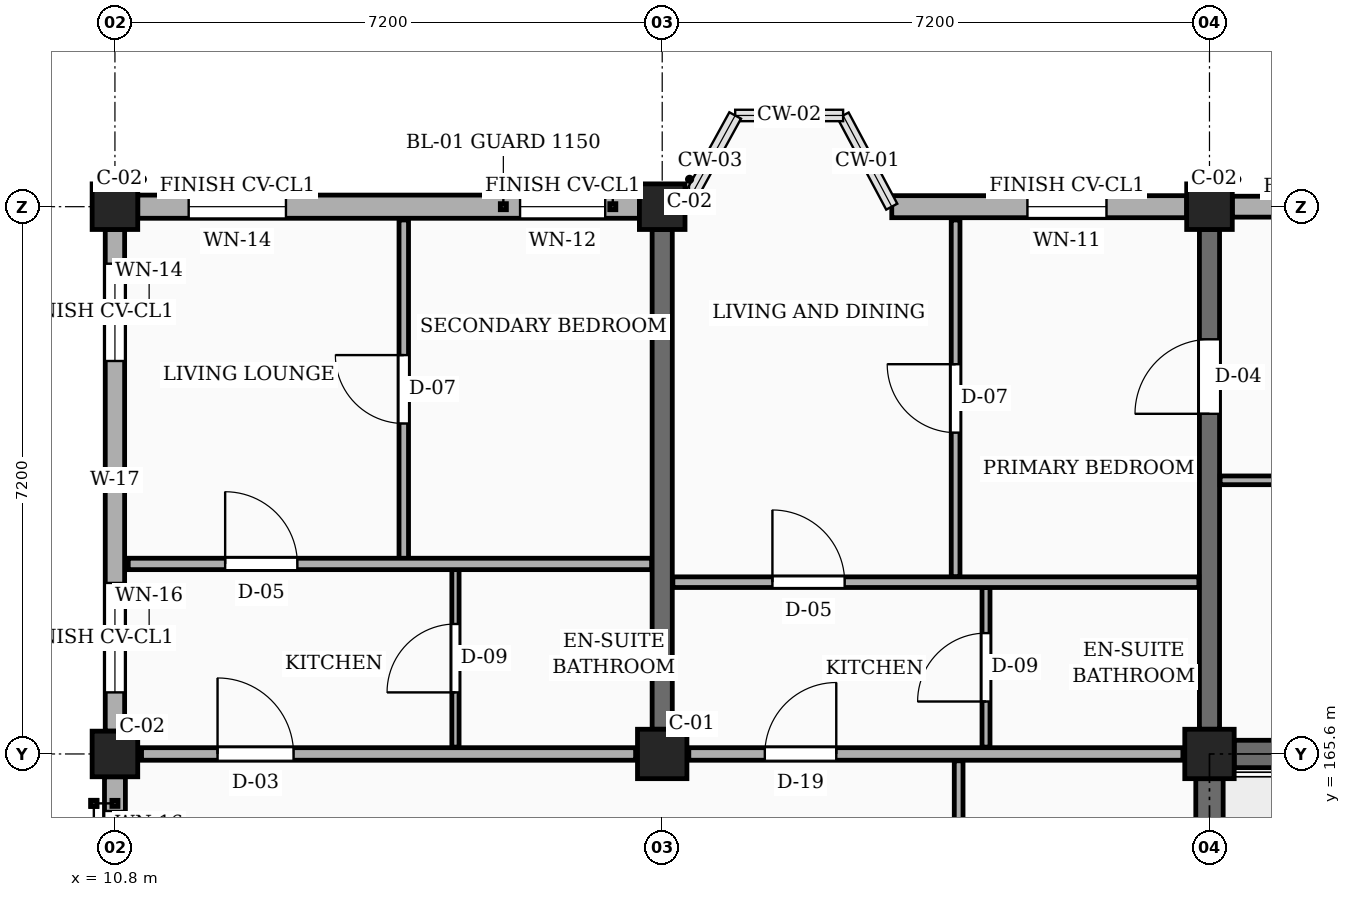
"""IFC4 building model, lengths in metres.
Left out: names, types, materials, properties, quantities, classifications, styles, units other than length and angle.
Written with IfcOpenShell. Run it as: python <this file> out.ifc"""

import sys

from ifc_helpers import new_model, si_unit, direction, frame, frame_2d, origin, origin_2d, place, context, subcontext, project, spatial, rectangle, extrude, element, fill, save


model = new_model("IFC4")
c1 = context("Model", 3, precision=1e-05, world=origin(), true_north=direction((0.0, 1.0)))
c2 = subcontext(c1, "Body", "Model", "MODEL_VIEW")
j1 = project(units=[si_unit("LENGTHUNIT", "METRE"), si_unit("PLANEANGLEUNIT", "RADIAN")], contexts=[c1])
p1 = place(None, origin())
s1 = spatial("IfcSite", under=j1, at=p1, CompositionType="ELEMENT")
p2 = place(p1, origin())
s2 = spatial("IfcBuilding", under=s1, at=p2, CompositionType="ELEMENT")
p3 = place(p2, frame((0.0, 0.0, 7.65)))
s3 = spatial("IfcBuildingStorey", under=s2, at=p3, CompositionType="ELEMENT", Elevation=7.65)
for number, where, z_axis, x_axis in (
    (1, (10.8, 165.6, 0.0), (0.0, 0.0, 1.0), (1.0, 0.0, 0.0)),
    (2, (10.8, 172.8, 0.0), (0.0, 0.0, 1.0), (1.0, 0.0, 0.0)),
):
    element("IfcColumn", number, at=place(p3, frame(where, z_axis=z_axis, x_axis=x_axis)), inside=s3, PredefinedType="COLUMN", context=c2, shape_type="SweptSolid", body=[
        extrude(rectangle(XDim=0.6, YDim=0.6, at=origin_2d()), origin(), (0.0, 0.0, 1.0), 3.15),
    ])
p4 = place(p3, frame((18.0, 165.6, 0.0), z_axis=(0.0, 0.0, 1.0), x_axis=(1.0, 0.0, 0.0)))
e3 = element("IfcColumn", 3, at=p4, inside=s3, PredefinedType="COLUMN", context=c2, shape_type="SweptSolid", body=[
    extrude(rectangle(XDim=0.65, YDim=0.65, at=origin_2d()), origin(), (0.0, 0.0, 1.0), 3.15),
])
p5 = place(p3, frame((18.0, 172.8, 0.0), z_axis=(0.0, 0.0, 1.0), x_axis=(1.0, 0.0, 0.0)))
e4 = element("IfcColumn", 4, at=p5, inside=s3, PredefinedType="COLUMN", context=c2, shape_type="SweptSolid", body=[
    extrude(rectangle(XDim=0.6, YDim=0.6, at=origin_2d()), origin(), (0.0, 0.0, 1.0), 3.15),
])
p6 = place(p3, frame((25.2, 165.6, 0.0), z_axis=(0.0, 0.0, 1.0), x_axis=(1.0, 0.0, 0.0)))
e5 = element("IfcColumn", 5, at=p6, inside=s3, PredefinedType="COLUMN", context=c2, shape_type="SweptSolid", body=[
    extrude(rectangle(XDim=0.65, YDim=0.65, at=origin_2d()), origin(), (0.0, 0.0, 1.0), 3.15),
])
p7 = place(p3, frame((25.2, 172.8, 0.0), z_axis=(0.0, 0.0, 1.0), x_axis=(1.0, 0.0, 0.0)))
e6 = element("IfcColumn", 6, at=p7, inside=s3, PredefinedType="COLUMN", context=c2, shape_type="SweptSolid", body=[
    extrude(rectangle(XDim=0.6, YDim=0.6, at=origin_2d()), origin(), (0.0, 0.0, 1.0), 3.15),
])
p8 = place(p3, frame((18.0, 165.925, 0.0), z_axis=(0.0, 0.0, 1.0), x_axis=(0.0, 1.0, 0.0)))
e7 = element("IfcWall", 7, at=p8, inside=s3, PredefinedType="SOLIDWALL", context=c2, shape_type="SweptSolid", body=[
    extrude(rectangle(XDim=6.575, YDim=0.265, at=frame_2d((3.288, 0.0))), origin(), (0.0, 0.0, 1.0), 2.185),
])
p9 = place(p3, frame((25.2, 165.925, 0.0), z_axis=(0.0, 0.0, 1.0), x_axis=(0.0, 1.0, 0.0)))
e8 = element("IfcWall", 8, at=p9, inside=s3, PredefinedType="SOLIDWALL", context=c2, shape_type="SweptSolid", body=[
    extrude(rectangle(XDim=6.575, YDim=0.265, at=frame_2d((3.288, 0.0))), origin(), (0.0, 0.0, 1.0), 2.185),
])
p10 = place(p9, frame((4.15, 0.0, 0.0)))
e9 = element("IfcOpeningElement", 9, at=p10, cuts=e8, PredefinedType="OPENING", context=c2, shape_type="SweptSolid", body=[
    extrude(rectangle(XDim=0.98, YDim=2.12, at=frame_2d((0.49, 1.06))), frame((0.0, 0.143, 0.0), z_axis=(0.0, -1.0, 0.0), x_axis=(1.0, 0.0, 0.0)), (0.0, 0.0, 1.0), 0.285),
])
p11 = place(p3, frame((32.1, 172.8, 0.0), z_axis=(0.0, 0.0, 1.0), x_axis=(-1.0, 0.0, 0.0)))
e10 = element("IfcWall", 10, at=p11, inside=s3, PredefinedType="SOLIDWALL", context=c2, shape_type="SweptSolid", body=[
    extrude(rectangle(XDim=6.6, YDim=0.275, at=frame_2d((3.3, 0.0))), origin(), (0.0, 0.0, 1.0), 2.455),
])
p12 = place(p11, frame((0.45, 0.0, 0.78)))
e11 = element("IfcOpeningElement", 11, at=p12, cuts=e10, PredefinedType="OPENING", context=c2, shape_type="SweptSolid", body=[
    extrude(rectangle(XDim=0.88, YDim=1.26, at=frame_2d((0.44, 0.63))), frame((0.0, 0.147, 0.0), z_axis=(0.0, -1.0, 0.0), x_axis=(1.0, 0.0, 0.0)), (0.0, 0.0, 1.0), 0.295),
])
p13 = place(p11, frame((4.65, 0.0, 0.78)))
e12 = element("IfcOpeningElement", 12, at=p13, cuts=e10, PredefinedType="OPENING", context=c2, shape_type="SweptSolid", body=[
    extrude(rectangle(XDim=1.04, YDim=1.26, at=frame_2d((0.52, 0.63))), frame((0.0, 0.147, 0.0), z_axis=(0.0, -1.0, 0.0), x_axis=(1.0, 0.0, 0.0)), (0.0, 0.0, 1.0), 0.295),
])
p14 = place(p3, frame((24.9, 172.8, 0.0), z_axis=(0.0, 0.0, 1.0), x_axis=(-1.0, 0.0, 0.0)))
e13 = element("IfcWall", 13, at=p14, inside=s3, PredefinedType="SOLIDWALL", context=c2, shape_type="SweptSolid", body=[
    extrude(rectangle(XDim=3.88, YDim=0.29, at=frame_2d((1.94, 0.0))), origin(), (0.0, 0.0, 1.0), 2.455),
])
p15 = place(p14, frame((1.055, 0.0, 0.78)))
e14 = element("IfcOpeningElement", 14, at=p15, cuts=e13, PredefinedType="OPENING", context=c2, shape_type="SweptSolid", body=[
    extrude(rectangle(XDim=1.04, YDim=1.26, at=frame_2d((0.52, 0.63))), frame((0.0, 0.155, 0.0), z_axis=(0.0, -1.0, 0.0), x_axis=(1.0, 0.0, 0.0)), (0.0, 0.0, 1.0), 0.31),
])
p16 = place(p3, frame((17.7, 172.8, 0.0), z_axis=(0.0, 0.0, 1.0), x_axis=(-1.0, 0.0, 0.0)))
e15 = element("IfcWall", 15, at=p16, inside=s3, PredefinedType="SOLIDWALL", context=c2, shape_type="SweptSolid", body=[
    extrude(rectangle(XDim=6.6, YDim=0.305, at=frame_2d((3.3, 0.0))), origin(), (0.0, 0.0, 1.0), 2.455),
])
p17 = place(p16, frame((0.45, 0.0, 0.78)))
e16 = element("IfcOpeningElement", 16, at=p17, cuts=e15, PredefinedType="OPENING", context=c2, shape_type="SweptSolid", body=[
    extrude(rectangle(XDim=1.12, YDim=1.26, at=frame_2d((0.56, 0.63))), frame((0.0, 0.163, 0.0), z_axis=(0.0, -1.0, 0.0), x_axis=(1.0, 0.0, 0.0)), (0.0, 0.0, 1.0), 0.325),
])
p18 = place(p16, frame((4.65, 0.0, 0.78)))
e17 = element("IfcOpeningElement", 17, at=p18, cuts=e15, PredefinedType="OPENING", context=c2, shape_type="SweptSolid", body=[
    extrude(rectangle(XDim=1.28, YDim=1.26, at=frame_2d((0.64, 0.63))), frame((0.0, 0.163, 0.0), z_axis=(0.0, -1.0, 0.0), x_axis=(1.0, 0.0, 0.0)), (0.0, 0.0, 1.0), 0.325),
])
p19 = place(p3, frame((10.8, 172.5, 0.0), z_axis=(0.0, 0.0, 1.0), x_axis=(0.0, -1.0, 0.0)))
e18 = element("IfcWall", 18, at=p19, inside=s3, PredefinedType="SOLIDWALL", context=c2, shape_type="SweptSolid", body=[
    extrude(rectangle(XDim=6.6, YDim=0.255, at=frame_2d((3.3, 0.0))), origin(), (0.0, 0.0, 1.0), 2.455),
])
p20 = place(p19, frame((0.45, 0.0, 0.78)))
e19 = element("IfcOpeningElement", 19, at=p20, cuts=e18, PredefinedType="OPENING", context=c2, shape_type="SweptSolid", body=[
    extrude(rectangle(XDim=1.28, YDim=1.26, at=frame_2d((0.64, 0.63))), frame((0.0, 0.137, 0.0), z_axis=(0.0, -1.0, 0.0), x_axis=(1.0, 0.0, 0.0)), (0.0, 0.0, 1.0), 0.275),
])
p21 = place(p19, frame((4.65, 0.0, 0.78)))
e20 = element("IfcOpeningElement", 20, at=p21, cuts=e18, PredefinedType="OPENING", context=c2, shape_type="SweptSolid", body=[
    extrude(rectangle(XDim=1.44, YDim=1.26, at=frame_2d((0.72, 0.63))), frame((0.0, 0.137, 0.0), z_axis=(0.0, -1.0, 0.0), x_axis=(1.0, 0.0, 0.0)), (0.0, 0.0, 1.0), 0.275),
])
p22 = place(p3, frame((10.8, 165.3, 0.0), z_axis=(0.0, 0.0, 1.0), x_axis=(0.0, -1.0, 0.0)))
e21 = element("IfcWall", 21, at=p22, inside=s3, PredefinedType="SOLIDWALL", context=c2, shape_type="SweptSolid", body=[
    extrude(rectangle(XDim=6.6, YDim=0.275, at=frame_2d((3.3, 0.0))), origin(), (0.0, 0.0, 1.0), 2.455),
])
p23 = place(p22, frame((0.45, 0.0, 0.78)))
e22 = element("IfcOpeningElement", 22, at=p23, cuts=e21, PredefinedType="OPENING", context=c2, shape_type="SweptSolid", body=[
    extrude(rectangle(XDim=1.44, YDim=1.26, at=frame_2d((0.72, 0.63))), frame((0.0, 0.147, 0.0), z_axis=(0.0, -1.0, 0.0), x_axis=(1.0, 0.0, 0.0)), (0.0, 0.0, 1.0), 0.295),
])
p24 = place(p22, frame((4.65, 0.0, 0.78)))
e23 = element("IfcOpeningElement", 23, at=p24, cuts=e21, PredefinedType="OPENING", context=c2, shape_type="SweptSolid", body=[
    extrude(rectangle(XDim=0.98, YDim=1.36, at=frame_2d((0.49, 0.68))), frame((0.0, 0.147, 0.0), z_axis=(0.0, -1.0, 0.0), x_axis=(1.0, 0.0, 0.0)), (0.0, 0.0, 1.0), 0.295),
])
p25 = place(p3, frame((25.2, 158.725, 0.0), z_axis=(0.0, 0.0, 1.0), x_axis=(0.0, 1.0, 0.0)))
e24 = element("IfcWall", 24, at=p25, inside=s3, PredefinedType="SHEAR", context=c2, shape_type="SweptSolid", body=[
    extrude(rectangle(XDim=6.55, YDim=0.36, at=frame_2d((3.275, 0.0))), origin(), (0.0, 0.0, 1.0), 2.885),
])
p26 = place(p3, frame((25.525, 165.6, 0.0), z_axis=(0.0, 0.0, 1.0), x_axis=(1.0, 0.0, 0.0)))
e25 = element("IfcWall", 25, at=p26, inside=s3, PredefinedType="SHEAR", context=c2, shape_type="SweptSolid", body=[
    extrude(rectangle(XDim=6.55, YDim=0.36, at=frame_2d((3.275, 0.0))), origin(), (0.0, 0.0, 1.0), 2.885),
])
p27 = place(p3, frame((11.15, 165.6, 0.0), z_axis=(0.0, 0.0, 1.0), x_axis=(1.0, 0.0, 0.0)))
e26 = element("IfcWall", 26, at=p27, inside=s3, PredefinedType="PARTITIONING", context=c2, shape_type="SweptSolid", body=[
    extrude(rectangle(XDim=6.5, YDim=0.165, at=frame_2d((3.25, 0.0))), origin(), (0.0, 0.0, 1.0), 2.185),
])
p28 = place(p27, frame((1.0, 0.0, 0.0)))
e27 = element("IfcOpeningElement", 27, at=p28, cuts=e26, PredefinedType="OPENING", context=c2, shape_type="SweptSolid", body=[
    extrude(rectangle(XDim=1.0, YDim=2.15, at=frame_2d((0.5, 1.075))), frame((0.0, 0.093, 0.0), z_axis=(0.0, -1.0, 0.0), x_axis=(1.0, 0.0, 0.0)), (0.0, 0.0, 1.0), 0.185),
])
p29 = place(p3, frame((18.35, 165.6, 0.0), z_axis=(0.0, 0.0, 1.0), x_axis=(1.0, 0.0, 0.0)))
e28 = element("IfcWall", 28, at=p29, inside=s3, PredefinedType="PARTITIONING", context=c2, shape_type="SweptSolid", body=[
    extrude(rectangle(XDim=6.5, YDim=0.165, at=frame_2d((3.25, 0.0))), origin(), (0.0, 0.0, 1.0), 2.185),
])
p30 = place(p29, frame((1.0, 0.0, 0.0)))
e29 = element("IfcOpeningElement", 29, at=p30, cuts=e28, PredefinedType="OPENING", context=c2, shape_type="SweptSolid", body=[
    extrude(rectangle(XDim=0.94, YDim=2.12, at=frame_2d((0.47, 1.06))), frame((0.0, 0.093, 0.0), z_axis=(0.0, -1.0, 0.0), x_axis=(1.0, 0.0, 0.0)), (0.0, 0.0, 1.0), 0.185),
])
p31 = place(p3, frame((14.6, 168.17, 0.0), z_axis=(0.0, 0.0, 1.0), x_axis=(0.0, 1.0, 0.0)))
e30 = element("IfcWall", 30, at=p31, inside=s3, PredefinedType="PARTITIONING", context=c2, shape_type="SweptSolid", body=[
    extrude(rectangle(XDim=4.455, YDim=0.125, at=frame_2d((2.228, 0.0))), origin(), (0.0, 0.0, 1.0), 2.32),
])
p32 = place(p31, frame((1.778, 0.0, 0.0)))
e31 = element("IfcOpeningElement", 31, at=p32, cuts=e30, PredefinedType="OPENING", context=c2, shape_type="SweptSolid", body=[
    extrude(rectangle(XDim=0.9, YDim=2.1, at=frame_2d((0.45, 1.05))), frame((0.0, 0.073, 0.0), z_axis=(0.0, -1.0, 0.0), x_axis=(1.0, 0.0, 0.0)), (0.0, 0.0, 1.0), 0.145),
])
p33 = place(p3, frame((15.28, 165.69, 0.0), z_axis=(0.0, 0.0, 1.0), x_axis=(0.0, 1.0, 0.0)))
e32 = element("IfcWall", 32, at=p33, inside=s3, PredefinedType="PARTITIONING", context=c2, shape_type="SweptSolid", body=[
    extrude(rectangle(XDim=2.34, YDim=0.095, at=frame_2d((1.17, 0.0))), origin(), (0.0, 0.0, 1.0), 2.32),
])
p34 = place(p33, frame((0.72, 0.0, 0.0)))
e33 = element("IfcOpeningElement", 33, at=p34, cuts=e32, PredefinedType="OPENING", context=c2, shape_type="SweptSolid", body=[
    extrude(rectangle(XDim=0.9, YDim=2.05, at=frame_2d((0.45, 1.025))), frame((0.0, 0.058, 0.0), z_axis=(0.0, -1.0, 0.0), x_axis=(1.0, 0.0, 0.0)), (0.0, 0.0, 1.0), 0.115),
])
p35 = place(p3, frame((10.975, 168.1, 0.0), z_axis=(0.0, 0.0, 1.0), x_axis=(1.0, 0.0, 0.0)))
e34 = element("IfcWall", 34, at=p35, inside=s3, PredefinedType="PARTITIONING", context=c2, shape_type="SweptSolid", body=[
    extrude(rectangle(XDim=6.885, YDim=0.15, at=frame_2d((3.442, 0.0))), origin(), (0.0, 0.0, 1.0), 2.32),
])
p36 = place(p35, frame((1.275, 0.0, 0.0)))
e35 = element("IfcOpeningElement", 35, at=p36, cuts=e34, PredefinedType="OPENING", context=c2, shape_type="SweptSolid", body=[
    extrude(rectangle(XDim=0.95, YDim=2.1, at=frame_2d((0.475, 1.05))), frame((0.0, 0.085, 0.0), z_axis=(0.0, -1.0, 0.0), x_axis=(1.0, 0.0, 0.0)), (0.0, 0.0, 1.0), 0.17),
])
p37 = place(p3, frame((21.9, 158.49, 0.0), z_axis=(0.0, 0.0, 1.0), x_axis=(0.0, 1.0, 0.0)))
e36 = element("IfcWall", 36, at=p37, inside=s3, PredefinedType="PARTITIONING", context=c2, shape_type="SweptSolid", body=[
    extrude(rectangle(XDim=7.02, YDim=0.115, at=frame_2d((3.51, 0.0))), origin(), (0.0, 0.0, 1.0), 2.32),
])
p38 = place(p37, frame((2.85, 0.0, 0.0)))
e37 = element("IfcOpeningElement", 37, at=p38, cuts=e36, PredefinedType="OPENING", context=c2, shape_type="SweptSolid", body=[
    extrude(rectangle(XDim=1.02, YDim=2.15, at=frame_2d((0.51, 1.075))), frame((0.0, 0.067, 0.0), z_axis=(0.0, -1.0, 0.0), x_axis=(1.0, 0.0, 0.0)), (0.0, 0.0, 1.0), 0.135),
])
p39 = place(p3, frame((21.86, 167.93, 0.0), z_axis=(0.0, 0.0, 1.0), x_axis=(0.0, 1.0, 0.0)))
e38 = element("IfcWall", 38, at=p39, inside=s3, PredefinedType="PARTITIONING", context=c2, shape_type="SweptSolid", body=[
    extrude(rectangle(XDim=4.695, YDim=0.115, at=frame_2d((2.348, 0.0))), origin(), (0.0, 0.0, 1.0), 2.32),
])
p40 = place(p39, frame((1.897, 0.0, 0.0)))
e39 = element("IfcOpeningElement", 39, at=p40, cuts=e38, PredefinedType="OPENING", context=c2, shape_type="SweptSolid", body=[
    extrude(rectangle(XDim=0.9, YDim=2.1, at=frame_2d((0.45, 1.05))), frame((0.0, 0.067, 0.0), z_axis=(0.0, -1.0, 0.0), x_axis=(1.0, 0.0, 0.0)), (0.0, 0.0, 1.0), 0.135),
])
p41 = place(p3, frame((22.26, 165.69, 0.0), z_axis=(0.0, 0.0, 1.0), x_axis=(0.0, 1.0, 0.0)))
e40 = element("IfcWall", 40, at=p41, inside=s3, PredefinedType="PARTITIONING", context=c2, shape_type="SweptSolid", body=[
    extrude(rectangle(XDim=2.1, YDim=0.105, at=frame_2d((1.05, 0.0))), origin(), (0.0, 0.0, 1.0), 2.32),
])
p42 = place(p41, frame((0.6, 0.0, 0.0)))
e41 = element("IfcOpeningElement", 41, at=p42, cuts=e40, PredefinedType="OPENING", context=c2, shape_type="SweptSolid", body=[
    extrude(rectangle(XDim=0.9, YDim=2.05, at=frame_2d((0.45, 1.025))), frame((0.0, 0.062, 0.0), z_axis=(0.0, -1.0, 0.0), x_axis=(1.0, 0.0, 0.0)), (0.0, 0.0, 1.0), 0.125),
])
p43 = place(p3, frame((18.14, 167.86, 0.0), z_axis=(0.0, 0.0, 1.0), x_axis=(1.0, 0.0, 0.0)))
e42 = element("IfcWall", 42, at=p43, inside=s3, PredefinedType="PARTITIONING", context=c2, shape_type="SweptSolid", body=[
    extrude(rectangle(XDim=6.92, YDim=0.14, at=frame_2d((3.46, 0.0))), origin(), (0.0, 0.0, 1.0), 2.32),
])
p44 = place(p43, frame((1.31, 0.0, 0.0)))
e43 = element("IfcOpeningElement", 43, at=p44, cuts=e42, PredefinedType="OPENING", context=c2, shape_type="SweptSolid", body=[
    extrude(rectangle(XDim=0.95, YDim=2.1, at=frame_2d((0.475, 1.05))), frame((0.0, 0.08, 0.0), z_axis=(0.0, -1.0, 0.0), x_axis=(1.0, 0.0, 0.0)), (0.0, 0.0, 1.0), 0.16),
])
p45 = place(p3, frame((25.34, 169.2, 0.0), z_axis=(0.0, 0.0, 1.0), x_axis=(1.0, 0.0, 0.0)))
e44 = element("IfcWall", 44, at=p45, inside=s3, PredefinedType="PARTITIONING", context=c2, shape_type="SweptSolid", body=[
    extrude(rectangle(XDim=6.92, YDim=0.115, at=frame_2d((3.46, 0.0))), origin(), (0.0, 0.0, 1.0), 2.32),
])
p46 = place(p45, frame((1.05, 0.0, 0.0)))
e45 = element("IfcOpeningElement", 45, at=p46, cuts=e44, PredefinedType="OPENING", context=c2, shape_type="SweptSolid", body=[
    extrude(rectangle(XDim=0.87, YDim=2.05, at=frame_2d((0.435, 1.025))), frame((0.0, 0.067, 0.0), z_axis=(0.0, -1.0, 0.0), x_axis=(1.0, 0.0, 0.0)), (0.0, 0.0, 1.0), 0.135),
])
p47 = place(p45, frame((4.45, 0.0, 0.0)))
e46 = element("IfcOpeningElement", 46, at=p47, cuts=e44, PredefinedType="OPENING", context=c2, shape_type="SweptSolid", body=[
    extrude(rectangle(XDim=0.88, YDim=2.08, at=frame_2d((0.44, 1.04))), frame((0.0, 0.067, 0.0), z_axis=(0.0, -1.0, 0.0), x_axis=(1.0, 0.0, 0.0)), (0.0, 0.0, 1.0), 0.135),
])
p48 = place(p15, origin())
e47 = element("IfcWindow", 47, at=p48, inside=s3, PartitioningType="SINGLE_PANEL", PredefinedType="WINDOW", context=c2, shape_type="SweptSolid", body=[
    extrude(rectangle(XDim=1.04, YDim=1.26, at=frame_2d((0.52, 0.63))), frame((0.0, 0.03, 0.0), z_axis=(0.0, -1.0, 0.0), x_axis=(1.0, 0.0, 0.0)), (0.0, 0.0, 1.0), 0.06),
])
fill(e14, e47)
p49 = place(p17, origin())
e48 = element("IfcWindow", 48, at=p49, inside=s3, PartitioningType="SINGLE_PANEL", PredefinedType="WINDOW", context=c2, shape_type="SweptSolid", body=[
    extrude(rectangle(XDim=1.12, YDim=1.26, at=frame_2d((0.56, 0.63))), frame((0.0, 0.03, 0.0), z_axis=(0.0, -1.0, 0.0), x_axis=(1.0, 0.0, 0.0)), (0.0, 0.0, 1.0), 0.06),
])
fill(e16, e48)
p50 = place(p18, origin())
e49 = element("IfcWindow", 49, at=p50, inside=s3, PartitioningType="SINGLE_PANEL", PredefinedType="WINDOW", context=c2, shape_type="SweptSolid", body=[
    extrude(rectangle(XDim=1.28, YDim=1.26, at=frame_2d((0.64, 0.63))), frame((0.0, 0.03, 0.0), z_axis=(0.0, -1.0, 0.0), x_axis=(1.0, 0.0, 0.0)), (0.0, 0.0, 1.0), 0.06),
])
fill(e17, e49)
p51 = place(p20, origin())
e50 = element("IfcWindow", 50, at=p51, inside=s3, PartitioningType="SINGLE_PANEL", PredefinedType="WINDOW", context=c2, shape_type="SweptSolid", body=[
    extrude(rectangle(XDim=1.28, YDim=1.26, at=frame_2d((0.64, 0.63))), frame((0.0, 0.03, 0.0), z_axis=(0.0, -1.0, 0.0), x_axis=(1.0, 0.0, 0.0)), (0.0, 0.0, 1.0), 0.06),
])
fill(e19, e50)
p52 = place(p21, origin())
e51 = element("IfcWindow", 51, at=p52, inside=s3, PartitioningType="SINGLE_PANEL", PredefinedType="WINDOW", context=c2, shape_type="SweptSolid", body=[
    extrude(rectangle(XDim=1.44, YDim=1.26, at=frame_2d((0.72, 0.63))), frame((0.0, 0.03, 0.0), z_axis=(0.0, -1.0, 0.0), x_axis=(1.0, 0.0, 0.0)), (0.0, 0.0, 1.0), 0.06),
])
fill(e20, e51)
p53 = place(p23, origin())
e52 = element("IfcWindow", 52, at=p53, inside=s3, PartitioningType="SINGLE_PANEL", PredefinedType="WINDOW", context=c2, shape_type="SweptSolid", body=[
    extrude(rectangle(XDim=1.44, YDim=1.26, at=frame_2d((0.72, 0.63))), frame((0.0, 0.03, 0.0), z_axis=(0.0, -1.0, 0.0), x_axis=(1.0, 0.0, 0.0)), (0.0, 0.0, 1.0), 0.06),
])
fill(e22, e52)
p54 = place(p28, origin())
e53 = element("IfcDoor", 53, at=p54, inside=s3, OperationType="SINGLE_SWING_LEFT", PredefinedType="DOOR", context=c2, shape_type="SweptSolid", body=[
    extrude(rectangle(XDim=1.0, YDim=2.15, at=frame_2d((0.5, 1.075))), frame((0.0, 0.025, 0.0), z_axis=(0.0, -1.0, 0.0), x_axis=(1.0, 0.0, 0.0)), (0.0, 0.0, 1.0), 0.05),
])
fill(e27, e53)
p55 = place(p30, origin())
e54 = element("IfcDoor", 54, at=p55, inside=s3, OperationType="SINGLE_SWING_RIGHT", PredefinedType="DOOR", context=c2, shape_type="SweptSolid", body=[
    extrude(rectangle(XDim=0.94, YDim=2.12, at=frame_2d((0.47, 1.06))), frame((0.0, 0.025, 0.0), z_axis=(0.0, -1.0, 0.0), x_axis=(1.0, 0.0, 0.0)), (0.0, 0.0, 1.0), 0.05),
])
fill(e29, e54)
p56 = place(p32, origin())
e55 = element("IfcDoor", 55, at=p56, inside=s3, OperationType="SINGLE_SWING_RIGHT", PredefinedType="DOOR", context=c2, shape_type="SweptSolid", body=[
    extrude(rectangle(XDim=0.9, YDim=2.1, at=frame_2d((0.45, 1.05))), frame((0.0, 0.025, 0.0), z_axis=(0.0, -1.0, 0.0), x_axis=(1.0, 0.0, 0.0)), (0.0, 0.0, 1.0), 0.05),
])
fill(e31, e55)
p57 = place(p34, origin())
e56 = element("IfcDoor", 56, at=p57, inside=s3, OperationType="SINGLE_SWING_LEFT", PredefinedType="DOOR", context=c2, shape_type="SweptSolid", body=[
    extrude(rectangle(XDim=0.9, YDim=2.05, at=frame_2d((0.45, 1.025))), frame((0.0, 0.025, 0.0), z_axis=(0.0, -1.0, 0.0), x_axis=(1.0, 0.0, 0.0)), (0.0, 0.0, 1.0), 0.05),
])
fill(e33, e56)
p58 = place(p36, origin())
e57 = element("IfcDoor", 57, at=p58, inside=s3, OperationType="SINGLE_SWING_LEFT", PredefinedType="DOOR", context=c2, shape_type="SweptSolid", body=[
    extrude(rectangle(XDim=0.95, YDim=2.1, at=frame_2d((0.475, 1.05))), frame((0.0, 0.025, 0.0), z_axis=(0.0, -1.0, 0.0), x_axis=(1.0, 0.0, 0.0)), (0.0, 0.0, 1.0), 0.05),
])
fill(e35, e57)
p59 = place(p40, origin())
e58 = element("IfcDoor", 58, at=p59, inside=s3, OperationType="SINGLE_SWING_RIGHT", PredefinedType="DOOR", context=c2, shape_type="SweptSolid", body=[
    extrude(rectangle(XDim=0.9, YDim=2.1, at=frame_2d((0.45, 1.05))), frame((0.0, 0.025, 0.0), z_axis=(0.0, -1.0, 0.0), x_axis=(1.0, 0.0, 0.0)), (0.0, 0.0, 1.0), 0.05),
])
fill(e39, e58)
p60 = place(p42, origin())
e59 = element("IfcDoor", 59, at=p60, inside=s3, OperationType="SINGLE_SWING_LEFT", PredefinedType="DOOR", context=c2, shape_type="SweptSolid", body=[
    extrude(rectangle(XDim=0.9, YDim=2.05, at=frame_2d((0.45, 1.025))), frame((0.0, 0.025, 0.0), z_axis=(0.0, -1.0, 0.0), x_axis=(1.0, 0.0, 0.0)), (0.0, 0.0, 1.0), 0.05),
])
fill(e41, e59)
p61 = place(p44, origin())
e60 = element("IfcDoor", 60, at=p61, inside=s3, OperationType="SINGLE_SWING_LEFT", PredefinedType="DOOR", context=c2, shape_type="SweptSolid", body=[
    extrude(rectangle(XDim=0.95, YDim=2.1, at=frame_2d((0.475, 1.05))), frame((0.0, 0.025, 0.0), z_axis=(0.0, -1.0, 0.0), x_axis=(1.0, 0.0, 0.0)), (0.0, 0.0, 1.0), 0.05),
])
fill(e43, e60)
p62 = place(p10, origin())
e61 = element("IfcDoor", 61, at=p62, inside=s3, OperationType="SINGLE_SWING_LEFT", PredefinedType="DOOR", context=c2, shape_type="SweptSolid", body=[
    extrude(rectangle(XDim=0.98, YDim=2.12, at=frame_2d((0.49, 1.06))), frame((0.0, 0.025, 0.0), z_axis=(0.0, -1.0, 0.0), x_axis=(1.0, 0.0, 0.0)), (0.0, 0.0, 1.0), 0.05),
])
fill(e9, e61)
save(model, sys.argv[1])
